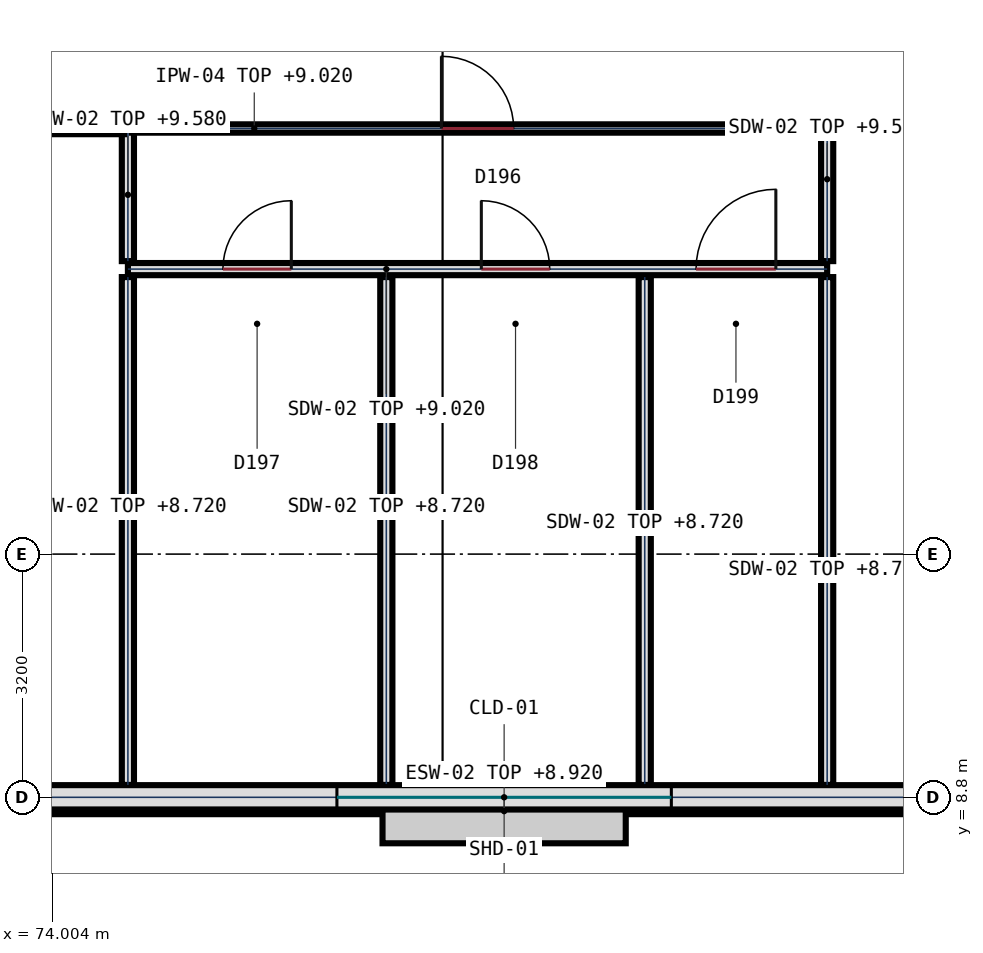
"""IFC4 building model, lengths in metres.
Left out: names, types, materials, properties, quantities, classifications, styles, units other than length and angle.
Written with IfcOpenShell. Run it as: python <this file> out.ifc"""

import sys

from ifc_helpers import new_model, si_unit, direction, frame, frame_2d, origin, place, context, subcontext, project, spatial, polyline, rectangle, outline, extrude, element, fill, save


model = new_model("IFC4")
c1 = context("Model", 3, precision=1e-05, world=origin(), true_north=direction((0.0, 1.0)))
c2 = subcontext(c1, "Body", "Model", "MODEL_VIEW")
j1 = project(units=[si_unit("LENGTHUNIT", "METRE"), si_unit("PLANEANGLEUNIT", "RADIAN")], contexts=[c1])
p1 = place(None, origin())
s1 = spatial("IfcSite", under=j1, at=p1, CompositionType="ELEMENT")
p2 = place(p1, origin())
s2 = spatial("IfcBuilding", under=s1, at=p2, CompositionType="ELEMENT")
p3 = place(p2, frame((0.0, 0.0, 5.4)))
s3 = spatial("IfcBuildingStorey", under=s2, at=p3, CompositionType="ELEMENT", Elevation=5.4)
p4 = place(p3, frame((86.698, 8.8, 0.0), z_axis=(0.0, 0.0, 1.0), x_axis=(-1.0, 0.0, 0.0)))
e1 = element("IfcWall", 1, at=p4, inside=s3, PredefinedType="SOLIDWALL", context=c2, shape_type="SweptSolid", body=[
    extrude(rectangle(XDim=13.496, YDim=0.32, at=frame_2d((6.748, 0.0))), origin(), (0.0, 0.0, 1.0), 3.52),
])
p5 = place(p4, frame((4.548, 0.0, 1.1)))
e2 = element("IfcOpeningElement", 2, at=p5, cuts=e1, PredefinedType="OPENING", context=c2, shape_type="SweptSolid", body=[
    extrude(outline(polyline([(0.425, 0.85), (0.28, 0.824), (0.152, 0.751), (0.057, 0.638), (0.006, 0.499), (0.006, 0.351), (0.057, 0.213), (0.152, 0.099), (0.28, 0.026), (0.425, 0.0), (3.975, 0.0), (4.12, 0.026), (4.248, 0.099), (4.343, 0.212), (4.394, 0.351), (4.394, 0.499), (4.343, 0.637), (4.248, 0.751), (4.12, 0.824), (3.975, 0.85), (0.425, 0.85)])), frame((0.0, 0.17, 0.0), z_axis=(0.0, -1.0, 0.0), x_axis=(1.0, 0.0, 0.0)), (0.0, 0.0, 1.0), 0.34),
])
p6 = place(p3, frame((75.0, 15.75, 0.0), z_axis=(0.0, 0.0, 1.0), x_axis=(1.0, 0.0, 0.0)))
e3 = element("IfcWall", 3, at=p6, inside=s3, PredefinedType="PLUMBINGWALL", context=c2, shape_type="SweptSolid", body=[
    extrude(rectangle(XDim=9.2, YDim=0.16, at=frame_2d((4.6, 0.0))), origin(), (0.0, 0.0, 1.0), 3.62),
])
p7 = place(p6, frame((1.25, 0.0, 0.0)))
e4 = element("IfcOpeningElement", 4, at=p7, cuts=e3, PredefinedType="OPENING", context=c2, shape_type="SweptSolid", body=[
    extrude(rectangle(XDim=0.9, YDim=2.1, at=frame_2d((0.45, 1.05))), frame((0.0, 0.09, 0.0), z_axis=(0.0, -1.0, 0.0), x_axis=(1.0, 0.0, 0.0)), (0.0, 0.0, 1.0), 0.18),
])
p8 = place(p6, frame((4.65, 0.0, 0.0)))
e5 = element("IfcOpeningElement", 5, at=p8, cuts=e3, PredefinedType="OPENING", context=c2, shape_type="SweptSolid", body=[
    extrude(rectangle(XDim=0.9, YDim=2.1, at=frame_2d((0.45, 1.05))), frame((0.0, 0.09, 0.0), z_axis=(0.0, -1.0, 0.0), x_axis=(1.0, 0.0, 0.0)), (0.0, 0.0, 1.0), 0.18),
])
p9 = place(p6, frame((7.475, 0.0, 0.0)))
e6 = element("IfcOpeningElement", 6, at=p9, cuts=e3, PredefinedType="OPENING", context=c2, shape_type="SweptSolid", body=[
    extrude(rectangle(XDim=1.05, YDim=2.15, at=frame_2d((0.525, 1.075))), frame((0.0, 0.09, 0.0), z_axis=(0.0, -1.0, 0.0), x_axis=(1.0, 0.0, 0.0)), (0.0, 0.0, 1.0), 0.18),
])
p10 = place(p3, frame((75.0, 8.963, 0.0), z_axis=(0.0, 0.0, 1.0), x_axis=(0.0, 1.0, 0.0)))
e7 = element("IfcWall", 7, at=p10, inside=s3, PredefinedType="PLUMBINGWALL", context=c2, shape_type="SweptSolid", body=[
    extrude(rectangle(XDim=6.682, YDim=0.16, at=frame_2d((3.341, 0.0))), origin(), (0.0, 0.0, 1.0), 3.32),
])
p11 = place(p3, frame((75.0, 15.855, 0.0), z_axis=(0.0, 0.0, 1.0), x_axis=(0.0, 1.0, 0.0)))
e8 = element("IfcWall", 8, at=p11, inside=s3, PredefinedType="PLUMBINGWALL", context=c2, shape_type="SweptSolid", body=[
    extrude(rectangle(XDim=1.745, YDim=0.16, at=frame_2d((0.873, 0.0))), origin(), (0.0, 0.0, 1.0), 4.18),
])
for number, where, z_axis, x_axis in (
    (9, (78.4, 8.963, 0.0), (0.0, 0.0, 1.0), (0.0, 1.0, 0.0)),
    (10, (81.8, 8.963, 0.0), (0.0, 0.0, 1.0), (0.0, 1.0, 0.0)),
    (11, (84.2, 8.963, 0.0), (0.0, 0.0, 1.0), (0.0, 1.0, 0.0)),
):
    element("IfcWall", number, at=place(p3, frame(where, z_axis=z_axis, x_axis=x_axis)), inside=s3, PredefinedType="PLUMBINGWALL", context=c2, shape_type="SweptSolid", body=[
        extrude(rectangle(XDim=6.682, YDim=0.16, at=frame_2d((3.341, 0.0))), origin(), (0.0, 0.0, 1.0), 3.32),
    ])
p12 = place(p3, frame((84.2, 15.855, 0.0), z_axis=(0.0, 0.0, 1.0), x_axis=(0.0, 1.0, 0.0)))
e12 = element("IfcWall", 12, at=p12, inside=s3, PredefinedType="PLUMBINGWALL", context=c2, shape_type="SweptSolid", body=[
    extrude(rectangle(XDim=1.745, YDim=0.16, at=frame_2d((0.873, 0.0))), origin(), (0.0, 0.0, 1.0), 4.18),
])
p13 = place(p3, frame((0.178, 17.6, 0.0), z_axis=(0.0, 0.0, 1.0), x_axis=(1.0, 0.0, 0.0)))
e13 = element("IfcWall", 13, at=p13, inside=s3, PredefinedType="PARTITIONING", context=c2, shape_type="SweptSolid", body=[
    extrude(rectangle(XDim=74.772, YDim=0.15, at=frame_2d((37.386, 0.0))), origin(), (0.0, 0.0, 1.0), 3.21),
])
p14 = place(p13, frame((15.822, 0.0, 0.0)))
e14 = element("IfcOpeningElement", 14, at=p14, cuts=e13, PredefinedType="OPENING", context=c2, shape_type="SweptSolid", body=[
    extrude(rectangle(XDim=1.0, YDim=2.2, at=frame_2d((0.5, 1.1))), frame((0.0, 0.085, 0.0), z_axis=(0.0, -1.0, 0.0), x_axis=(1.0, 0.0, 0.0)), (0.0, 0.0, 1.0), 0.17),
])
p15 = place(p13, frame((51.797, 0.0, 0.0)))
e15 = element("IfcOpeningElement", 15, at=p15, cuts=e13, PredefinedType="OPENING", context=c2, shape_type="SweptSolid", body=[
    extrude(rectangle(XDim=1.85, YDim=2.35, at=frame_2d((0.925, 1.175))), frame((0.0, 0.085, 0.0), z_axis=(0.0, -1.0, 0.0), x_axis=(1.0, 0.0, 0.0)), (0.0, 0.0, 1.0), 0.17),
])
p16 = place(p3, frame((75.05, 17.6, 0.0), z_axis=(0.0, 0.0, 1.0), x_axis=(1.0, 0.0, 0.0)))
e16 = element("IfcWall", 16, at=p16, inside=s3, PredefinedType="PARTITIONING", context=c2, shape_type="SweptSolid", body=[
    extrude(rectangle(XDim=9.1, YDim=0.11, at=frame_2d((4.55, 0.0))), origin(), (0.0, 0.0, 1.0), 3.62),
])
p17 = place(p16, frame((4.075, 0.0, 0.0)))
e17 = element("IfcOpeningElement", 17, at=p17, cuts=e16, PredefinedType="OPENING", context=c2, shape_type="SweptSolid", body=[
    extrude(rectangle(XDim=0.95, YDim=2.15, at=frame_2d((0.475, 1.075))), frame((0.0, 0.065, 0.0), z_axis=(0.0, -1.0, 0.0), x_axis=(1.0, 0.0, 0.0)), (0.0, 0.0, 1.0), 0.13),
])
p18 = place(p3, frame((84.25, 17.6, 0.0), z_axis=(0.0, 0.0, 1.0), x_axis=(1.0, 0.0, 0.0)))
e18 = element("IfcWall", 18, at=p18, inside=s3, PredefinedType="PARTITIONING", context=c2, shape_type="SweptSolid", body=[
    extrude(rectangle(XDim=40.55, YDim=0.15, at=frame_2d((20.275, 0.0))), origin(), (0.0, 0.0, 1.0), 3.52),
])
p19 = place(p18, frame((8.75, 0.0, 0.0)))
e19 = element("IfcOpeningElement", 19, at=p19, cuts=e18, PredefinedType="OPENING", context=c2, shape_type="SweptSolid", body=[
    extrude(rectangle(XDim=1.0, YDim=2.2, at=frame_2d((0.5, 1.1))), frame((0.0, 0.085, 0.0), z_axis=(0.0, -1.0, 0.0), x_axis=(1.0, 0.0, 0.0)), (0.0, 0.0, 1.0), 0.17),
])
p20 = place(p18, frame((34.45, 0.0, 0.0)))
e20 = element("IfcOpeningElement", 20, at=p20, cuts=e18, PredefinedType="OPENING", context=c2, shape_type="SweptSolid", body=[
    extrude(rectangle(XDim=1.0, YDim=2.2, at=frame_2d((0.5, 1.1))), frame((0.0, 0.085, 0.0), z_axis=(0.0, -1.0, 0.0), x_axis=(1.0, 0.0, 0.0)), (0.0, 0.0, 1.0), 0.17),
])
p21 = place(p5, origin())
e21 = element("IfcWindow", 21, at=p21, inside=s3, PartitioningType="SINGLE_PANEL", PredefinedType="WINDOW", context=c2, shape_type="SweptSolid", body=[
    extrude(outline(polyline([(0.425, 0.85), (0.28, 0.824), (0.152, 0.751), (0.057, 0.638), (0.006, 0.499), (0.006, 0.351), (0.057, 0.213), (0.152, 0.099), (0.28, 0.026), (0.425, 0.0), (3.975, 0.0), (4.12, 0.026), (4.248, 0.099), (4.343, 0.212), (4.394, 0.351), (4.394, 0.499), (4.343, 0.637), (4.248, 0.751), (4.12, 0.824), (3.975, 0.85), (0.425, 0.85)])), frame((0.0, 0.032, 0.0), z_axis=(0.0, -1.0, 0.0), x_axis=(1.0, 0.0, 0.0)), (0.0, 0.0, 1.0), 0.065),
])
fill(e2, e21)
p22 = place(p17, origin())
e22 = element("IfcDoor", 22, at=p22, inside=s3, OperationType="SINGLE_SWING_LEFT", PredefinedType="DOOR", context=c2, shape_type="SweptSolid", body=[
    extrude(rectangle(XDim=0.95, YDim=2.15, at=frame_2d((0.475, 1.075))), frame((0.0, 0.032, 0.0), z_axis=(0.0, -1.0, 0.0), x_axis=(1.0, 0.0, 0.0)), (0.0, 0.0, 1.0), 0.065),
])
fill(e17, e22)
p23 = place(p7, origin())
e23 = element("IfcDoor", 23, at=p23, inside=s3, OperationType="SINGLE_SWING_RIGHT", PredefinedType="DOOR", context=c2, shape_type="SweptSolid", body=[
    extrude(rectangle(XDim=0.9, YDim=2.1, at=frame_2d((0.45, 1.05))), frame((0.0, 0.032, 0.0), z_axis=(0.0, -1.0, 0.0), x_axis=(1.0, 0.0, 0.0)), (0.0, 0.0, 1.0), 0.065),
])
fill(e4, e23)
p24 = place(p8, origin())
e24 = element("IfcDoor", 24, at=p24, inside=s3, OperationType="SINGLE_SWING_LEFT", PredefinedType="DOOR", context=c2, shape_type="SweptSolid", body=[
    extrude(rectangle(XDim=0.9, YDim=2.1, at=frame_2d((0.45, 1.05))), frame((0.0, 0.032, 0.0), z_axis=(0.0, -1.0, 0.0), x_axis=(1.0, 0.0, 0.0)), (0.0, 0.0, 1.0), 0.065),
])
fill(e5, e24)
p25 = place(p9, origin())
e25 = element("IfcDoor", 25, at=p25, inside=s3, OperationType="SINGLE_SWING_RIGHT", PredefinedType="DOOR", context=c2, shape_type="SweptSolid", body=[
    extrude(rectangle(XDim=1.05, YDim=2.15, at=frame_2d((0.525, 1.075))), frame((0.0, 0.032, 0.0), z_axis=(0.0, -1.0, 0.0), x_axis=(1.0, 0.0, 0.0)), (0.0, 0.0, 1.0), 0.065),
])
fill(e6, e25)
save(model, sys.argv[1])
